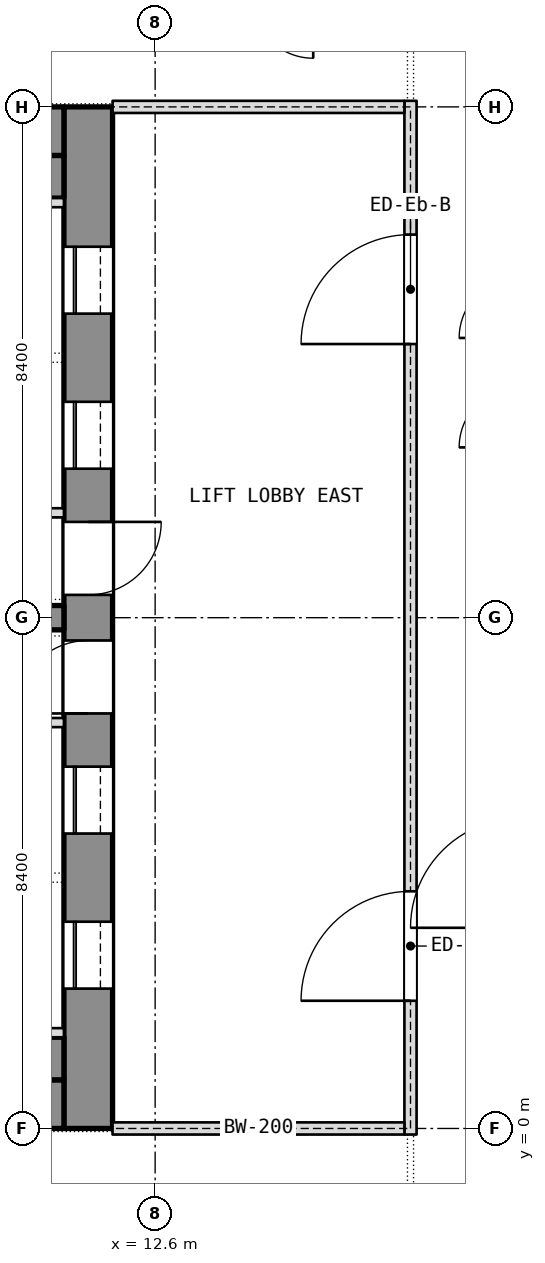
"""IFC4 building model, lengths in metres.
Left out: names, types, materials, properties, quantities, classifications, styles, units other than length and angle.
Written with IfcOpenShell. Run it as: python <this file> out.ifc"""

import sys

from ifc_helpers import new_model, si_unit, direction, frame, frame_2d, origin, place, context, subcontext, project, spatial, rectangle, extrude, element, fill, save


model = new_model("IFC4")
c1 = context("Model", 3, precision=1e-05, world=origin(), true_north=direction((0.0, 1.0)))
c2 = subcontext(c1, "Body", "Model", "MODEL_VIEW")
j1 = project(units=[si_unit("LENGTHUNIT", "METRE"), si_unit("PLANEANGLEUNIT", "RADIAN")], contexts=[c1])
p1 = place(None, origin())
s1 = spatial("IfcSite", under=j1, at=p1, CompositionType="ELEMENT")
p2 = place(p1, origin())
s2 = spatial("IfcBuilding", under=s1, at=p2, CompositionType="ELEMENT")
p3 = place(p2, frame((0.0, 0.0, 198.5)))
s3 = spatial("IfcBuildingStorey", under=s2, at=p3, CompositionType="ELEMENT", Elevation=198.5)
p4 = place(p3, frame((11.5, 0.0, 0.0), z_axis=(0.0, 0.0, 1.0), x_axis=(0.0, 1.0, 0.0)))
e1 = element("IfcWall", 1, at=p4, inside=s3, PredefinedType="SHEAR", context=c2, shape_type="SweptSolid", body=[
    extrude(rectangle(XDim=16.8, YDim=0.8, at=frame_2d((8.4, 0.0))), origin(), (0.0, 0.0, 1.0), 3.6),
])
p5 = place(p4, frame((2.3, 0.0, 0.0)))
e2 = element("IfcOpeningElement", 2, at=p5, cuts=e1, PredefinedType="OPENING", context=c2, shape_type="SweptSolid", body=[
    extrude(rectangle(XDim=1.1, YDim=2.1, at=frame_2d((0.55, 1.05))), frame((0.0, 0.4, 0.0), z_axis=(0.0, -1.0, 0.0), x_axis=(1.0, 0.0, 0.0)), (0.0, 0.0, 1.0), 0.8),
])
p6 = place(p4, frame((4.85, 0.0, 0.0)))
e3 = element("IfcOpeningElement", 3, at=p6, cuts=e1, PredefinedType="OPENING", context=c2, shape_type="SweptSolid", body=[
    extrude(rectangle(XDim=1.1, YDim=2.1, at=frame_2d((0.55, 1.05))), frame((0.0, 0.4, 0.0), z_axis=(0.0, -1.0, 0.0), x_axis=(1.0, 0.0, 0.0)), (0.0, 0.0, 1.0), 0.8),
])
p7 = place(p4, frame((6.825, 0.0, 0.0)))
e4 = element("IfcOpeningElement", 4, at=p7, cuts=e1, PredefinedType="OPENING", context=c2, shape_type="SweptSolid", body=[
    extrude(rectangle(XDim=1.2, YDim=2.1, at=frame_2d((0.6, 1.05))), frame((0.0, 0.4, 0.0), z_axis=(0.0, -1.0, 0.0), x_axis=(1.0, 0.0, 0.0)), (0.0, 0.0, 1.0), 0.8),
])
p8 = place(p4, frame((13.4, 0.0, 0.0)))
e5 = element("IfcOpeningElement", 5, at=p8, cuts=e1, PredefinedType="OPENING", context=c2, shape_type="SweptSolid", body=[
    extrude(rectangle(XDim=1.1, YDim=2.1, at=frame_2d((0.55, 1.05))), frame((0.0, 0.4, 0.0), z_axis=(0.0, -1.0, 0.0), x_axis=(1.0, 0.0, 0.0)), (0.0, 0.0, 1.0), 0.8),
])
p9 = place(p4, frame((10.85, 0.0, 0.0)))
e6 = element("IfcOpeningElement", 6, at=p9, cuts=e1, PredefinedType="OPENING", context=c2, shape_type="SweptSolid", body=[
    extrude(rectangle(XDim=1.1, YDim=2.1, at=frame_2d((0.55, 1.05))), frame((0.0, 0.4, 0.0), z_axis=(0.0, -1.0, 0.0), x_axis=(1.0, 0.0, 0.0)), (0.0, 0.0, 1.0), 0.8),
])
p10 = place(p4, frame((8.775, 0.0, 0.0)))
e7 = element("IfcOpeningElement", 7, at=p10, cuts=e1, PredefinedType="OPENING", context=c2, shape_type="SweptSolid", body=[
    extrude(rectangle(XDim=1.2, YDim=2.1, at=frame_2d((0.6, 1.05))), frame((0.0, 0.4, 0.0), z_axis=(0.0, -1.0, 0.0), x_axis=(1.0, 0.0, 0.0)), (0.0, 0.0, 1.0), 0.8),
])
for number, where, z_axis, x_axis in (
    (8, (-11.1, 0.4, 0.0), (0.0, 0.0, 1.0), (1.0, 0.0, 0.0)),
    (9, (-11.1, 16.4, 0.0), (0.0, 0.0, 1.0), (1.0, 0.0, 0.0)),
):
    element("IfcWall", number, at=place(p3, frame(where, z_axis=z_axis, x_axis=x_axis)), inside=s3, PredefinedType="SHEAR", context=c2, shape_type="SweptSolid", body=[
        extrude(rectangle(XDim=22.2, YDim=0.8, at=frame_2d((11.1, 0.0))), origin(), (0.0, 0.0, 1.0), 3.6),
    ])
p11 = place(p3, frame((4.4, 8.4, 0.0), z_axis=(0.0, 0.0, 1.0), x_axis=(1.0, 0.0, 0.0)))
e10 = element("IfcWall", 10, at=p11, inside=s3, PredefinedType="SHEAR", context=c2, shape_type="SweptSolid", body=[
    extrude(rectangle(XDim=6.7, YDim=0.4, at=frame_2d((3.35, 0.0))), origin(), (0.0, 0.0, 1.0), 3.6),
])
for number, where, z_axis, x_axis in (
    (11, (-11.1, 1.15, 0.0), (0.0, 0.0, 1.0), (1.0, 0.0, 0.0)),
    (12, (-11.1, 15.65, 0.0), (0.0, 0.0, 1.0), (1.0, 0.0, 0.0)),
):
    element("IfcWall", number, at=place(p3, frame(where, z_axis=z_axis, x_axis=x_axis)), inside=s3, PredefinedType="PARTITIONING", context=c2, shape_type="SweptSolid", body=[
        extrude(rectangle(XDim=22.2, YDim=0.7, at=frame_2d((11.1, 0.0))), origin(), (0.0, 0.0, 1.0), 3.34),
    ])
for number, where, z_axis, x_axis in (
    (13, (9.0, 6.675, 0.0), (0.0, 0.0, 1.0), (1.0, 0.0, 0.0)),
    (14, (9.0, 1.575, 0.0), (0.0, 0.0, 1.0), (1.0, 0.0, 0.0)),
    (15, (9.0, 10.125, 0.0), (0.0, 0.0, 1.0), (1.0, 0.0, 0.0)),
    (16, (9.0, 15.225, 0.0), (0.0, 0.0, 1.0), (1.0, 0.0, 0.0)),
):
    element("IfcWall", number, at=place(p3, frame(where, z_axis=z_axis, x_axis=x_axis)), inside=s3, PredefinedType="SHEAR", context=c2, shape_type="SweptSolid", body=[
        extrude(rectangle(XDim=2.1, YDim=0.15, at=frame_2d((1.05, 0.0))), origin(), (0.0, 0.0, 1.0), 3.6),
    ])
p12 = place(p3, frame((16.8, -0.1, 0.0), z_axis=(0.0, 0.0, 1.0), x_axis=(0.0, 1.0, 0.0)))
e17 = element("IfcWall", 17, at=p12, inside=s3, PredefinedType="PARTITIONING", context=c2, shape_type="SweptSolid", body=[
    extrude(rectangle(XDim=17.0, YDim=0.2, at=frame_2d((8.5, 0.0))), origin(), (0.0, 0.0, 1.0), 3.34),
])
p13 = place(p12, frame((2.2, 0.0, 0.0)))
e18 = element("IfcOpeningElement", 18, at=p13, cuts=e17, PredefinedType="OPENING", context=c2, shape_type="SweptSolid", body=[
    extrude(rectangle(XDim=1.8, YDim=2.1, at=frame_2d((0.9, 1.05))), frame((0.0, 0.1, 0.0), z_axis=(0.0, -1.0, 0.0), x_axis=(1.0, 0.0, 0.0)), (0.0, 0.0, 1.0), 0.2),
])
p14 = place(p12, frame((13.0, 0.0, 0.0)))
e19 = element("IfcOpeningElement", 19, at=p14, cuts=e17, PredefinedType="OPENING", context=c2, shape_type="SweptSolid", body=[
    extrude(rectangle(XDim=1.8, YDim=2.1, at=frame_2d((0.9, 1.05))), frame((0.0, 0.1, 0.0), z_axis=(0.0, -1.0, 0.0), x_axis=(1.0, 0.0, 0.0)), (0.0, 0.0, 1.0), 0.2),
])
for number, where, z_axis, x_axis in (
    (20, (11.9, 0.0, 0.0), (0.0, 0.0, 1.0), (1.0, 0.0, 0.0)),
    (21, (11.9, 16.8, 0.0), (0.0, 0.0, 1.0), (1.0, 0.0, 0.0)),
):
    element("IfcWall", number, at=place(p3, frame(where, z_axis=z_axis, x_axis=x_axis)), inside=s3, PredefinedType="PARTITIONING", context=c2, shape_type="SweptSolid", body=[
        extrude(rectangle(XDim=4.8, YDim=0.2, at=frame_2d((2.4, 0.0))), origin(), (0.0, 0.0, 1.0), 2.94),
    ])
p15 = place(p5, origin())
e22 = element("IfcDoor", 22, at=p15, inside=s3, OperationType="SLIDING_TO_LEFT", PredefinedType="DOOR", context=c2, shape_type="SweptSolid", body=[
    extrude(rectangle(XDim=1.1, YDim=2.1, at=frame_2d((0.55, 1.05))), frame((0.0, 0.025, 0.0), z_axis=(0.0, -1.0, 0.0), x_axis=(1.0, 0.0, 0.0)), (0.0, 0.0, 1.0), 0.05),
])
fill(e2, e22)
p16 = place(p6, origin())
e23 = element("IfcDoor", 23, at=p16, inside=s3, OperationType="SLIDING_TO_LEFT", PredefinedType="DOOR", context=c2, shape_type="SweptSolid", body=[
    extrude(rectangle(XDim=1.1, YDim=2.1, at=frame_2d((0.55, 1.05))), frame((0.0, 0.025, 0.0), z_axis=(0.0, -1.0, 0.0), x_axis=(1.0, 0.0, 0.0)), (0.0, 0.0, 1.0), 0.05),
])
fill(e3, e23)
p17 = place(p7, origin())
e24 = element("IfcDoor", 24, at=p17, inside=s3, OperationType="SINGLE_SWING_LEFT", PredefinedType="DOOR", context=c2, shape_type="SweptSolid", body=[
    extrude(rectangle(XDim=1.2, YDim=2.1, at=frame_2d((0.6, 1.05))), frame((0.0, 0.025, 0.0), z_axis=(0.0, -1.0, 0.0), x_axis=(1.0, 0.0, 0.0)), (0.0, 0.0, 1.0), 0.05),
])
fill(e4, e24)
p18 = place(p8, origin())
e25 = element("IfcDoor", 25, at=p18, inside=s3, OperationType="SLIDING_TO_LEFT", PredefinedType="DOOR", context=c2, shape_type="SweptSolid", body=[
    extrude(rectangle(XDim=1.1, YDim=2.1, at=frame_2d((0.55, 1.05))), frame((0.0, 0.025, 0.0), z_axis=(0.0, -1.0, 0.0), x_axis=(1.0, 0.0, 0.0)), (0.0, 0.0, 1.0), 0.05),
])
fill(e5, e25)
p19 = place(p9, origin())
e26 = element("IfcDoor", 26, at=p19, inside=s3, OperationType="SLIDING_TO_LEFT", PredefinedType="DOOR", context=c2, shape_type="SweptSolid", body=[
    extrude(rectangle(XDim=1.1, YDim=2.1, at=frame_2d((0.55, 1.05))), frame((0.0, 0.025, 0.0), z_axis=(0.0, -1.0, 0.0), x_axis=(1.0, 0.0, 0.0)), (0.0, 0.0, 1.0), 0.05),
])
fill(e6, e26)
p20 = place(p10, origin())
e27 = element("IfcDoor", 27, at=p20, inside=s3, OperationType="SINGLE_SWING_LEFT", PredefinedType="DOOR", context=c2, shape_type="SweptSolid", body=[
    extrude(rectangle(XDim=1.2, YDim=2.1, at=frame_2d((0.6, 1.05))), frame((0.0, 0.025, 0.0), z_axis=(0.0, -1.0, 0.0), x_axis=(1.0, 0.0, 0.0)), (0.0, 0.0, 1.0), 0.05),
])
fill(e7, e27)
p21 = place(p13, origin())
e28 = element("IfcDoor", 28, at=p21, inside=s3, OperationType="DOUBLE_DOOR_SINGLE_SWING", PredefinedType="DOOR", context=c2, shape_type="SweptSolid", body=[
    extrude(rectangle(XDim=1.8, YDim=2.1, at=frame_2d((0.9, 1.05))), frame((0.0, 0.025, 0.0), z_axis=(0.0, -1.0, 0.0), x_axis=(1.0, 0.0, 0.0)), (0.0, 0.0, 1.0), 0.05),
])
fill(e18, e28)
p22 = place(p14, origin())
e29 = element("IfcDoor", 29, at=p22, inside=s3, OperationType="DOUBLE_DOOR_SINGLE_SWING", PredefinedType="DOOR", context=c2, shape_type="SweptSolid", body=[
    extrude(rectangle(XDim=1.8, YDim=2.1, at=frame_2d((0.9, 1.05))), frame((0.0, 0.025, 0.0), z_axis=(0.0, -1.0, 0.0), x_axis=(1.0, 0.0, 0.0)), (0.0, 0.0, 1.0), 0.05),
])
fill(e19, e29)
save(model, sys.argv[1])
